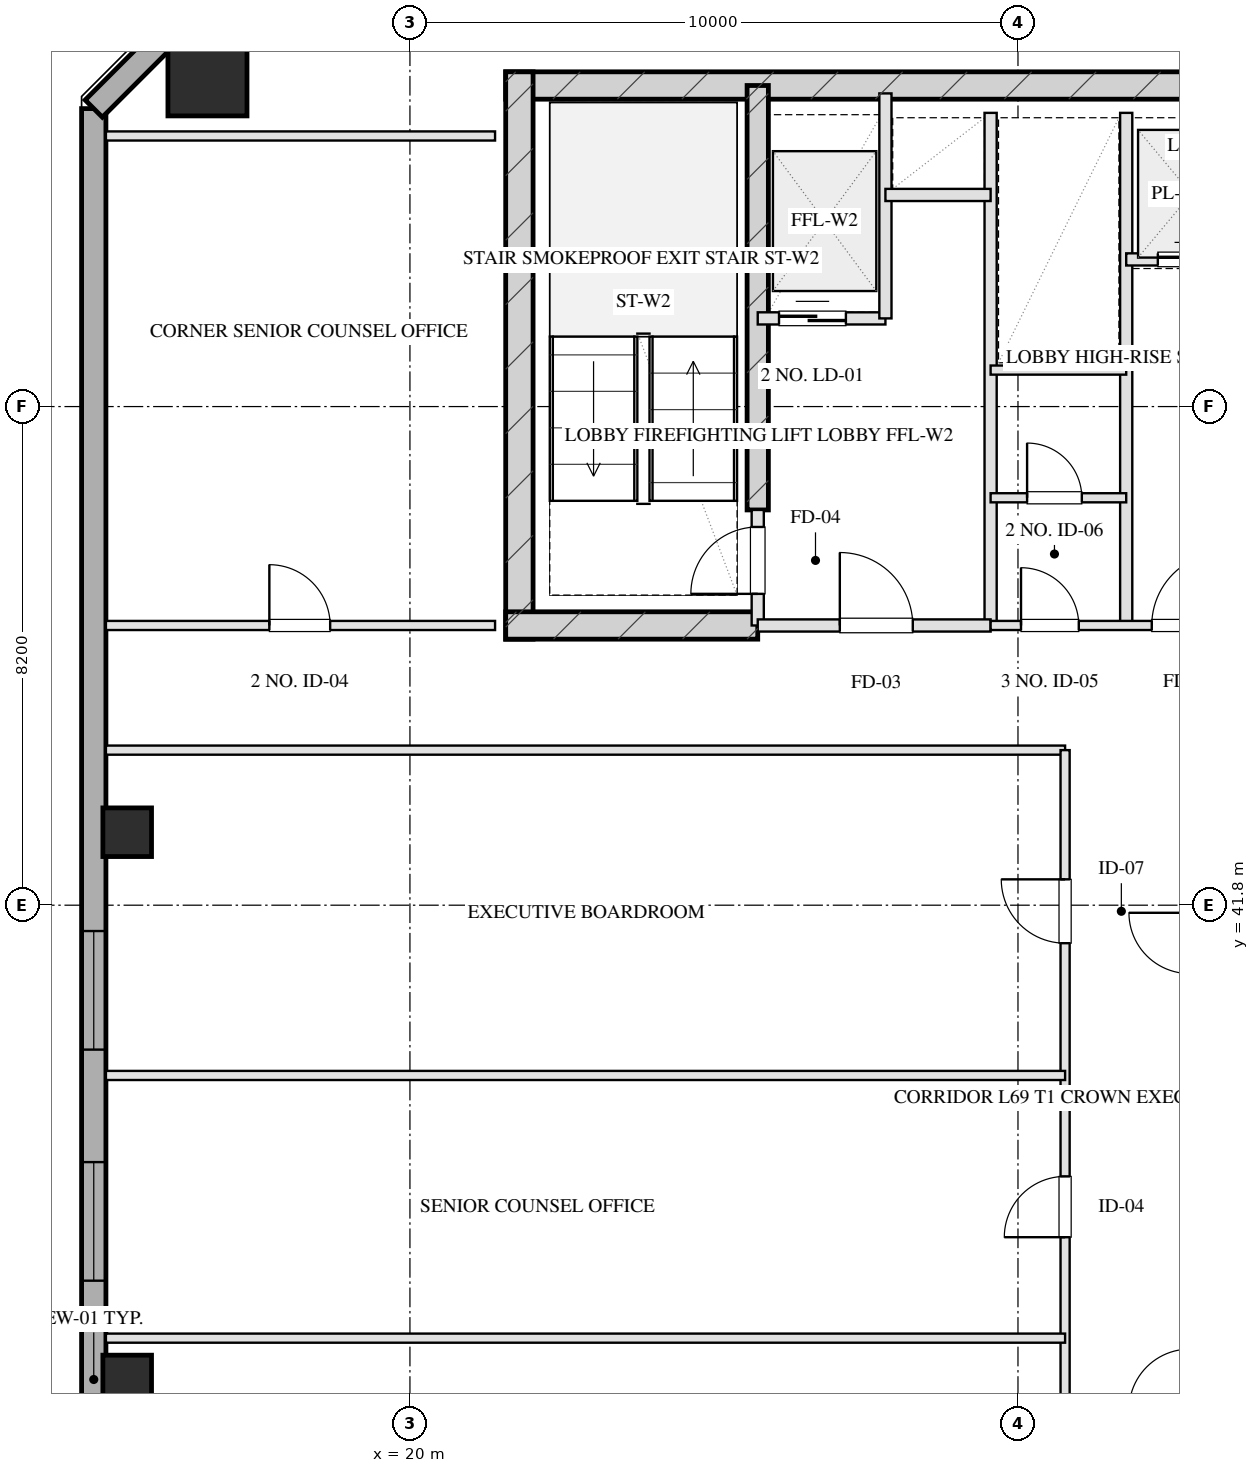
"""IFC4 building model, lengths in metres.
Left out: names, types, materials, properties, quantities, classifications, styles, units other than length and angle.
Written with IfcOpenShell. Run it as: python <this file> out.ifc"""

import sys

from ifc_helpers import new_model, si_unit, direction, frame, frame_2d, origin, origin_2d, place, context, subcontext, project, spatial, rectangle, hollow_rectangle, extrude, element, fill, save


model = new_model("IFC4")
c1 = context("Model", 3, precision=1e-05, world=origin(), true_north=direction((0.0, 1.0)))
c2 = subcontext(c1, "Body", "Model", "MODEL_VIEW")
j1 = project(units=[si_unit("LENGTHUNIT", "METRE"), si_unit("PLANEANGLEUNIT", "RADIAN")], contexts=[c1])
p1 = place(None, origin())
s1 = spatial("IfcSite", under=j1, at=p1, CompositionType="ELEMENT")
p2 = place(p1, origin())
s2 = spatial("IfcBuilding", under=s1, at=p2, CompositionType="ELEMENT")
p3 = place(p2, frame((0.0, 0.0, 253.6)))
s3 = spatial("IfcBuildingStorey", under=s2, at=p3, CompositionType="ELEMENT", Elevation=253.6)
p4 = place(p3, frame((21.575, 55.28, 0.0), z_axis=(0.0, 0.0, 1.0), x_axis=(1.0, 0.0, 0.0)))
e1 = element("IfcWall", 1, at=p4, inside=s3, PredefinedType="SHEAR", context=c2, shape_type="SweptSolid", body=[
    extrude(rectangle(XDim=16.85, YDim=0.45, at=frame_2d((8.425, 0.0))), origin(), (0.0, 0.0, 1.0), 3.2),
])
p5 = place(p3, frame((21.8, 46.175, 0.0), z_axis=(0.0, 0.0, 1.0), x_axis=(0.0, 1.0, 0.0)))
e2 = element("IfcWall", 2, at=p5, inside=s3, PredefinedType="SHEAR", context=c2, shape_type="SweptSolid", body=[
    extrude(rectangle(XDim=9.33, YDim=0.45, at=frame_2d((4.665, 0.0))), origin(), (0.0, 0.0, 1.0), 3.2),
])
p6 = place(p3, frame((25.72, 48.3, 0.0), z_axis=(0.0, 0.0, 1.0), x_axis=(0.0, 1.0, 0.0)))
e3 = element("IfcWall", 3, at=p6, inside=s3, PredefinedType="SHEAR", context=c2, shape_type="SweptSolid", body=[
    extrude(rectangle(XDim=6.98, YDim=0.35, at=frame_2d((3.49, 0.0))), origin(), (0.0, 0.0, 1.0), 3.2),
])
p7 = place(p3, frame((21.575, 46.4, 0.0), z_axis=(0.0, 0.0, 1.0), x_axis=(1.0, 0.0, 0.0)))
e4 = element("IfcWall", 4, at=p7, inside=s3, PredefinedType="SHEAR", context=c2, shape_type="SweptSolid", body=[
    extrude(rectangle(XDim=4.145, YDim=0.45, at=frame_2d((2.073, 0.0))), origin(), (0.0, 0.0, 1.0), 3.2),
])
p8 = place(p3, frame((16.67, 55.43, 0.0), z_axis=(0.0, 0.0, 1.0), x_axis=(1.0, 0.0, 0.0)))
e5 = element("IfcColumn", 5, at=p8, inside=s3, PredefinedType="COLUMN", context=c2, shape_type="SweptSolid", body=[
    extrude(hollow_rectangle(XDim=1.3, YDim=1.3, WallThickness=0.045, at=origin_2d()), origin(), (0.0, 0.0, 1.0), 3.201),
])
for number, where, z_axis, x_axis in (
    (6, (15.35, 34.0, 0.0), (0.0, 0.0, 1.0), (1.0, 0.0, 0.0)),
    (7, (15.35, 43.0, 0.0), (0.0, 0.0, 1.0), (1.0, 0.0, 0.0)),
):
    element("IfcColumn", number, at=place(p3, frame(where, z_axis=z_axis, x_axis=x_axis)), inside=s3, PredefinedType="COLUMN", context=c2, shape_type="SweptSolid", body=[
        extrude(hollow_rectangle(XDim=0.8, YDim=0.8, WallThickness=0.028, at=origin_2d()), origin(), (0.0, 0.0, 1.0), 3.201),
    ])
p9 = place(p3, frame((14.8, 13.1, 0.0), z_axis=(0.0, 0.0, 1.0), x_axis=(0.0, 1.0, 0.0)))
e8 = element("IfcWall", 8, at=p9, inside=s3, PredefinedType="SOLIDWALL", context=c2, shape_type="SweptSolid", body=[
    extrude(rectangle(XDim=41.8, YDim=0.4, at=frame_2d((20.9, 0.0))), origin(), (0.0, 0.0, 1.0), 2.36),
])
p10 = place(p9, frame((13.525, 0.0, 0.75)))
e9 = element("IfcOpeningElement", 9, at=p10, cuts=e8, PredefinedType="OPENING", context=c2, shape_type="SweptSolid", body=[
    extrude(rectangle(XDim=1.95, YDim=1.21, at=frame_2d((0.975, 0.605))), frame((0.0, 0.21, 0.0), z_axis=(0.0, -1.0, 0.0), x_axis=(1.0, 0.0, 0.0)), (0.0, 0.0, 1.0), 0.42),
])
p11 = place(p9, frame((17.325, 0.0, 0.75)))
e10 = element("IfcOpeningElement", 10, at=p11, cuts=e8, PredefinedType="OPENING", context=c2, shape_type="SweptSolid", body=[
    extrude(rectangle(XDim=1.95, YDim=1.21, at=frame_2d((0.975, 0.605))), frame((0.0, 0.21, 0.0), z_axis=(0.0, -1.0, 0.0), x_axis=(1.0, 0.0, 0.0)), (0.0, 0.0, 1.0), 0.42),
])
p12 = place(p9, frame((22.525, 0.0, 0.75)))
e11 = element("IfcOpeningElement", 11, at=p12, cuts=e8, PredefinedType="OPENING", context=c2, shape_type="SweptSolid", body=[
    extrude(rectangle(XDim=1.95, YDim=1.21, at=frame_2d((0.975, 0.605))), frame((0.0, 0.21, 0.0), z_axis=(0.0, -1.0, 0.0), x_axis=(1.0, 0.0, 0.0)), (0.0, 0.0, 1.0), 0.42),
])
p13 = place(p9, frame((26.325, 0.0, 0.75)))
e12 = element("IfcOpeningElement", 12, at=p13, cuts=e8, PredefinedType="OPENING", context=c2, shape_type="SweptSolid", body=[
    extrude(rectangle(XDim=1.95, YDim=1.21, at=frame_2d((0.975, 0.605))), frame((0.0, 0.21, 0.0), z_axis=(0.0, -1.0, 0.0), x_axis=(1.0, 0.0, 0.0)), (0.0, 0.0, 1.0), 0.42),
])
p14 = place(p3, frame((14.8, 54.9, 0.0), z_axis=(0.0, 0.0, 1.0), x_axis=(0.707070815327, 0.707142745217, 0.0)))
e13 = element("IfcWall", 13, at=p14, inside=s3, PredefinedType="SOLIDWALL", context=c2, shape_type="SweptSolid", body=[
    extrude(rectangle(XDim=3.394, YDim=0.4, at=frame_2d((1.697, 0.0))), origin(), (0.0, 0.0, 1.0), 2.36),
])
p15 = place(p3, frame((25.72, 46.4, 0.0), z_axis=(0.0, 0.0, 1.0), x_axis=(0.0, 1.0, 0.0)))
e14 = element("IfcWall", 14, at=p15, inside=s3, PredefinedType="PARTITIONING", context=c2, shape_type="SweptSolid", body=[
    extrude(rectangle(XDim=1.9, YDim=0.2, at=frame_2d((0.95, 0.0))), origin(), (0.0, 0.0, 1.0), 2.925),
])
p16 = place(p15, frame((0.52, 0.0, 0.0)))
e15 = element("IfcOpeningElement", 15, at=p16, cuts=e14, PredefinedType="OPENING", context=c2, shape_type="SweptSolid", body=[
    extrude(rectangle(XDim=1.1, YDim=2.05, at=frame_2d((0.55, 1.025))), frame((0.0, 0.11, 0.0), z_axis=(0.0, -1.0, 0.0), x_axis=(1.0, 0.0, 0.0)), (0.0, 0.0, 1.0), 0.22),
])
p17 = place(p3, frame((29.55, 46.4, 0.0), z_axis=(0.0, 0.0, 1.0), x_axis=(0.0, 1.0, 0.0)))
e16 = element("IfcWall", 16, at=p17, inside=s3, PredefinedType="PARTITIONING", context=c2, shape_type="SweptSolid", body=[
    extrude(rectangle(XDim=8.43, YDim=0.2, at=frame_2d((4.215, 0.0))), origin(), (0.0, 0.0, 1.0), 2.925),
])
p18 = place(p3, frame((25.72, 46.4, 0.0), z_axis=(0.0, 0.0, 1.0), x_axis=(1.0, 0.0, 0.0)))
e17 = element("IfcWall", 17, at=p18, inside=s3, PredefinedType="PARTITIONING", context=c2, shape_type="SweptSolid", body=[
    extrude(rectangle(XDim=3.83, YDim=0.2, at=frame_2d((1.915, 0.0))), origin(), (0.0, 0.0, 1.0), 2.925),
])
p19 = place(p18, frame((1.35, 0.0, 0.0)))
e18 = element("IfcOpeningElement", 18, at=p19, cuts=e17, PredefinedType="OPENING", context=c2, shape_type="SweptSolid", body=[
    extrude(rectangle(XDim=1.2, YDim=2.05, at=frame_2d((0.6, 1.025))), frame((0.0, 0.11, 0.0), z_axis=(0.0, -1.0, 0.0), x_axis=(1.0, 0.0, 0.0)), (0.0, 0.0, 1.0), 0.22),
])
p20 = place(p3, frame((25.72, 51.45, 0.0), z_axis=(0.0, 0.0, 1.0), x_axis=(1.0, 0.0, 0.0)))
e19 = element("IfcWall", 19, at=p20, inside=s3, PredefinedType="PARTITIONING", context=c2, shape_type="SweptSolid", body=[
    extrude(rectangle(XDim=2.1, YDim=0.2, at=frame_2d((1.05, 0.0))), origin(), (0.0, 0.0, 1.0), 2.925),
])
p21 = place(p20, frame((0.35, 0.0, 0.0)))
e20 = element("IfcOpeningElement", 20, at=p21, cuts=e19, PredefinedType="OPENING", context=c2, shape_type="SweptSolid", body=[
    extrude(rectangle(XDim=1.1, YDim=2.05, at=frame_2d((0.55, 1.025))), frame((0.0, 0.11, 0.0), z_axis=(0.0, -1.0, 0.0), x_axis=(1.0, 0.0, 0.0)), (0.0, 0.0, 1.0), 0.22),
])
p22 = place(p3, frame((27.82, 51.45, 0.0), z_axis=(0.0, 0.0, 1.0), x_axis=(0.0, 1.0, 0.0)))
e21 = element("IfcWall", 21, at=p22, inside=s3, PredefinedType="PARTITIONING", context=c2, shape_type="SweptSolid", body=[
    extrude(rectangle(XDim=3.7, YDim=0.2, at=frame_2d((1.85, 0.0))), origin(), (0.0, 0.0, 1.0), 2.925),
])
p23 = place(p3, frame((27.82, 53.48, 0.0), z_axis=(0.0, 0.0, 1.0), x_axis=(1.0, 0.0, 0.0)))
e22 = element("IfcWall", 22, at=p23, inside=s3, PredefinedType="PARTITIONING", context=c2, shape_type="SweptSolid", body=[
    extrude(rectangle(XDim=1.73, YDim=0.2, at=frame_2d((0.865, 0.0))), origin(), (0.0, 0.0, 1.0), 2.925),
])
p24 = place(p3, frame((31.78, 46.4, 0.0), z_axis=(0.0, 0.0, 1.0), x_axis=(0.0, 1.0, 0.0)))
e23 = element("IfcWall", 23, at=p24, inside=s3, PredefinedType="PARTITIONING", context=c2, shape_type="SweptSolid", body=[
    extrude(rectangle(XDim=8.43, YDim=0.2, at=frame_2d((4.215, 0.0))), origin(), (0.0, 0.0, 1.0), 2.925),
])
p25 = place(p3, frame((29.55, 46.4, 0.0), z_axis=(0.0, 0.0, 1.0), x_axis=(1.0, 0.0, 0.0)))
e24 = element("IfcWall", 24, at=p25, inside=s3, PredefinedType="PARTITIONING", context=c2, shape_type="SweptSolid", body=[
    extrude(rectangle(XDim=4.4, YDim=0.15, at=frame_2d((2.2, 0.0))), origin(), (0.0, 0.0, 1.0), 2.925),
])
p26 = place(p25, frame((0.5, 0.0, 0.0)))
e25 = element("IfcOpeningElement", 25, at=p26, cuts=e24, PredefinedType="OPENING", context=c2, shape_type="SweptSolid", body=[
    extrude(rectangle(XDim=0.95, YDim=2.05, at=frame_2d((0.475, 1.025))), frame((0.0, 0.085, 0.0), z_axis=(0.0, -1.0, 0.0), x_axis=(1.0, 0.0, 0.0)), (0.0, 0.0, 1.0), 0.17),
])
p27 = place(p25, frame((2.65, 0.0, 0.0)))
e26 = element("IfcOpeningElement", 26, at=p27, cuts=e24, PredefinedType="OPENING", context=c2, shape_type="SweptSolid", body=[
    extrude(rectangle(XDim=1.2, YDim=2.05, at=frame_2d((0.6, 1.025))), frame((0.0, 0.085, 0.0), z_axis=(0.0, -1.0, 0.0), x_axis=(1.0, 0.0, 0.0)), (0.0, 0.0, 1.0), 0.17),
])
p28 = place(p3, frame((29.55, 50.6, 0.0), z_axis=(0.0, 0.0, 1.0), x_axis=(1.0, 0.0, 0.0)))
e27 = element("IfcWall", 27, at=p28, inside=s3, PredefinedType="PARTITIONING", context=c2, shape_type="SweptSolid", body=[
    extrude(rectangle(XDim=2.23, YDim=0.15, at=frame_2d((1.115, 0.0))), origin(), (0.0, 0.0, 1.0), 2.925),
])
p29 = place(p3, frame((29.55, 48.5, 0.0), z_axis=(0.0, 0.0, 1.0), x_axis=(1.0, 0.0, 0.0)))
e28 = element("IfcWall", 28, at=p29, inside=s3, PredefinedType="PARTITIONING", context=c2, shape_type="SweptSolid", body=[
    extrude(rectangle(XDim=2.23, YDim=0.15, at=frame_2d((1.115, 0.0))), origin(), (0.0, 0.0, 1.0), 2.925),
])
p30 = place(p29, frame((0.6, 0.0, 0.0)))
e29 = element("IfcOpeningElement", 29, at=p30, cuts=e28, PredefinedType="OPENING", context=c2, shape_type="SweptSolid", body=[
    extrude(rectangle(XDim=0.9, YDim=2.05, at=frame_2d((0.45, 1.025))), frame((0.0, 0.085, 0.0), z_axis=(0.0, -1.0, 0.0), x_axis=(1.0, 0.0, 0.0)), (0.0, 0.0, 1.0), 0.17),
])
p31 = place(p3, frame((31.78, 52.42, 0.0), z_axis=(0.0, 0.0, 1.0), x_axis=(1.0, 0.0, 0.0)))
e30 = element("IfcWall", 30, at=p31, inside=s3, PredefinedType="PARTITIONING", context=c2, shape_type="SweptSolid", body=[
    extrude(rectangle(XDim=2.17, YDim=0.2, at=frame_2d((1.085, 0.0))), origin(), (0.0, 0.0, 1.0), 2.925),
])
p32 = place(p31, frame((0.52, 0.0, 0.0)))
e31 = element("IfcOpeningElement", 31, at=p32, cuts=e30, PredefinedType="OPENING", context=c2, shape_type="SweptSolid", body=[
    extrude(rectangle(XDim=1.1, YDim=2.05, at=frame_2d((0.55, 1.025))), frame((0.0, 0.11, 0.0), z_axis=(0.0, -1.0, 0.0), x_axis=(1.0, 0.0, 0.0)), (0.0, 0.0, 1.0), 0.22),
])
p33 = place(p3, frame((15.0, 54.45, 0.0), z_axis=(0.0, 0.0, 1.0), x_axis=(1.0, 0.0, 0.0)))
e32 = element("IfcWall", 32, at=p33, inside=s3, PredefinedType="PARTITIONING", context=c2, shape_type="SweptSolid", body=[
    extrude(rectangle(XDim=6.4, YDim=0.15, at=frame_2d((3.2, 0.0))), origin(), (0.0, 0.0, 1.0), 2.925),
])
p34 = place(p3, frame((15.0, 46.4, 0.0), z_axis=(0.0, 0.0, 1.0), x_axis=(1.0, 0.0, 0.0)))
e33 = element("IfcWall", 33, at=p34, inside=s3, PredefinedType="PARTITIONING", context=c2, shape_type="SweptSolid", body=[
    extrude(rectangle(XDim=6.4, YDim=0.15, at=frame_2d((3.2, 0.0))), origin(), (0.0, 0.0, 1.0), 2.925),
])
p35 = place(p34, frame((2.688, 0.0, 0.0)))
e34 = element("IfcOpeningElement", 34, at=p35, cuts=e33, PredefinedType="OPENING", context=c2, shape_type="SweptSolid", body=[
    extrude(rectangle(XDim=1.0, YDim=2.05, at=frame_2d((0.5, 1.025))), frame((0.0, 0.085, 0.0), z_axis=(0.0, -1.0, 0.0), x_axis=(1.0, 0.0, 0.0)), (0.0, 0.0, 1.0), 0.17),
])
p36 = place(p3, frame((15.0, 44.35, 0.0), z_axis=(0.0, 0.0, 1.0), x_axis=(1.0, 0.0, 0.0)))
e35 = element("IfcWall", 35, at=p36, inside=s3, PredefinedType="PARTITIONING", context=c2, shape_type="SweptSolid", body=[
    extrude(rectangle(XDim=15.775, YDim=0.15, at=frame_2d((7.887, 0.0))), origin(), (0.0, 0.0, 1.0), 2.925),
])
p37 = place(p3, frame((30.775, 23.65, 0.0), z_axis=(0.0, 0.0, 1.0), x_axis=(0.0, 1.0, 0.0)))
e36 = element("IfcWall", 36, at=p37, inside=s3, PredefinedType="PARTITIONING", context=c2, shape_type="SweptSolid", body=[
    extrude(rectangle(XDim=20.7, YDim=0.15, at=frame_2d((10.35, 0.0))), origin(), (0.0, 0.0, 1.0), 2.925),
])
p38 = place(p37, frame((2.175, 0.0, 0.0)))
e37 = element("IfcOpeningElement", 37, at=p38, cuts=e36, PredefinedType="OPENING", context=c2, shape_type="SweptSolid", body=[
    extrude(rectangle(XDim=1.0, YDim=2.05, at=frame_2d((0.5, 1.025))), frame((0.0, 0.085, 0.0), z_axis=(0.0, -1.0, 0.0), x_axis=(1.0, 0.0, 0.0)), (0.0, 0.0, 1.0), 0.17),
])
p39 = place(p37, frame((7.69, 0.0, 0.0)))
e38 = element("IfcOpeningElement", 38, at=p39, cuts=e36, PredefinedType="OPENING", context=c2, shape_type="SweptSolid", body=[
    extrude(rectangle(XDim=1.0, YDim=2.05, at=frame_2d((0.5, 1.025))), frame((0.0, 0.085, 0.0), z_axis=(0.0, -1.0, 0.0), x_axis=(1.0, 0.0, 0.0)), (0.0, 0.0, 1.0), 0.17),
])
p40 = place(p37, frame((12.69, 0.0, 0.0)))
e39 = element("IfcOpeningElement", 39, at=p40, cuts=e36, PredefinedType="OPENING", context=c2, shape_type="SweptSolid", body=[
    extrude(rectangle(XDim=1.0, YDim=2.05, at=frame_2d((0.5, 1.025))), frame((0.0, 0.085, 0.0), z_axis=(0.0, -1.0, 0.0), x_axis=(1.0, 0.0, 0.0)), (0.0, 0.0, 1.0), 0.17),
])
p41 = place(p37, frame((17.525, 0.0, 0.0)))
e40 = element("IfcOpeningElement", 40, at=p41, cuts=e36, PredefinedType="OPENING", context=c2, shape_type="SweptSolid", body=[
    extrude(rectangle(XDim=1.05, YDim=2.05, at=frame_2d((0.525, 1.025))), frame((0.0, 0.085, 0.0), z_axis=(0.0, -1.0, 0.0), x_axis=(1.0, 0.0, 0.0)), (0.0, 0.0, 1.0), 0.17),
])
for number, where, z_axis, x_axis in (
    (41, (15.0, 34.68, 0.0), (0.0, 0.0, 1.0), (1.0, 0.0, 0.0)),
    (42, (15.0, 39.0, 0.0), (0.0, 0.0, 1.0), (1.0, 0.0, 0.0)),
):
    element("IfcWall", number, at=place(p3, frame(where, z_axis=z_axis, x_axis=x_axis)), inside=s3, PredefinedType="PARTITIONING", context=c2, shape_type="SweptSolid", body=[
        extrude(rectangle(XDim=15.775, YDim=0.15, at=frame_2d((7.887, 0.0))), origin(), (0.0, 0.0, 1.0), 2.925),
    ])
p42 = place(p12, origin())
e43 = element("IfcWindow", 43, at=p42, inside=s3, PartitioningType="TRIPLE_PANEL_VERTICAL", PredefinedType="WINDOW", context=c2, shape_type="SweptSolid", body=[
    extrude(rectangle(XDim=1.95, YDim=1.21, at=frame_2d((0.975, 0.605))), frame((0.0, 0.03, 0.0), z_axis=(0.0, -1.0, 0.0), x_axis=(1.0, 0.0, 0.0)), (0.0, 0.0, 1.0), 0.06),
])
fill(e11, e43)
p43 = place(p13, origin())
e44 = element("IfcWindow", 44, at=p43, inside=s3, PartitioningType="TRIPLE_PANEL_VERTICAL", PredefinedType="WINDOW", context=c2, shape_type="SweptSolid", body=[
    extrude(rectangle(XDim=1.95, YDim=1.21, at=frame_2d((0.975, 0.605))), frame((0.0, 0.03, 0.0), z_axis=(0.0, -1.0, 0.0), x_axis=(1.0, 0.0, 0.0)), (0.0, 0.0, 1.0), 0.06),
])
fill(e12, e44)
p44 = place(p16, origin())
e45 = element("IfcDoor", 45, at=p44, inside=s3, OperationType="SINGLE_SWING_LEFT", PredefinedType="DOOR", context=c2, shape_type="SweptSolid", body=[
    extrude(rectangle(XDim=1.1, YDim=2.05, at=frame_2d((0.55, 1.025))), frame((0.0, 0.025, 0.0), z_axis=(0.0, -1.0, 0.0), x_axis=(1.0, 0.0, 0.0)), (0.0, 0.0, 1.0), 0.05),
])
fill(e15, e45)
p45 = place(p19, origin())
e46 = element("IfcDoor", 46, at=p45, inside=s3, OperationType="SINGLE_SWING_LEFT", PredefinedType="DOOR", context=c2, shape_type="SweptSolid", body=[
    extrude(rectangle(XDim=1.2, YDim=2.05, at=frame_2d((0.6, 1.025))), frame((0.0, 0.025, 0.0), z_axis=(0.0, -1.0, 0.0), x_axis=(1.0, 0.0, 0.0)), (0.0, 0.0, 1.0), 0.05),
])
fill(e18, e46)
p46 = place(p21, origin())
e47 = element("IfcDoor", 47, at=p46, inside=s3, OperationType="DOUBLE_DOOR_SLIDING", PredefinedType="DOOR", context=c2, shape_type="SweptSolid", body=[
    extrude(rectangle(XDim=1.1, YDim=2.05, at=frame_2d((0.55, 1.025))), frame((0.0, 0.025, 0.0), z_axis=(0.0, -1.0, 0.0), x_axis=(1.0, 0.0, 0.0)), (0.0, 0.0, 1.0), 0.05),
])
fill(e20, e47)
p47 = place(p26, origin())
e48 = element("IfcDoor", 48, at=p47, inside=s3, OperationType="SINGLE_SWING_LEFT", PredefinedType="DOOR", context=c2, shape_type="SweptSolid", body=[
    extrude(rectangle(XDim=0.95, YDim=2.05, at=frame_2d((0.475, 1.025))), frame((0.0, 0.025, 0.0), z_axis=(0.0, -1.0, 0.0), x_axis=(1.0, 0.0, 0.0)), (0.0, 0.0, 1.0), 0.05),
])
fill(e25, e48)
p48 = place(p27, origin())
e49 = element("IfcDoor", 49, at=p48, inside=s3, OperationType="SINGLE_SWING_RIGHT", PredefinedType="DOOR", context=c2, shape_type="SweptSolid", body=[
    extrude(rectangle(XDim=1.2, YDim=2.05, at=frame_2d((0.6, 1.025))), frame((0.0, 0.025, 0.0), z_axis=(0.0, -1.0, 0.0), x_axis=(1.0, 0.0, 0.0)), (0.0, 0.0, 1.0), 0.05),
])
fill(e26, e49)
p49 = place(p30, origin())
e50 = element("IfcDoor", 50, at=p49, inside=s3, OperationType="SINGLE_SWING_LEFT", PredefinedType="DOOR", context=c2, shape_type="SweptSolid", body=[
    extrude(rectangle(XDim=0.9, YDim=2.05, at=frame_2d((0.45, 1.025))), frame((0.0, 0.025, 0.0), z_axis=(0.0, -1.0, 0.0), x_axis=(1.0, 0.0, 0.0)), (0.0, 0.0, 1.0), 0.05),
])
fill(e29, e50)
p50 = place(p32, origin())
e51 = element("IfcDoor", 51, at=p50, inside=s3, OperationType="DOUBLE_DOOR_SLIDING", PredefinedType="DOOR", context=c2, shape_type="SweptSolid", body=[
    extrude(rectangle(XDim=1.1, YDim=2.05, at=frame_2d((0.55, 1.025))), frame((0.0, 0.025, 0.0), z_axis=(0.0, -1.0, 0.0), x_axis=(1.0, 0.0, 0.0)), (0.0, 0.0, 1.0), 0.05),
])
fill(e31, e51)
p51 = place(p35, origin())
e52 = element("IfcDoor", 52, at=p51, inside=s3, OperationType="SINGLE_SWING_LEFT", PredefinedType="DOOR", context=c2, shape_type="SweptSolid", body=[
    extrude(rectangle(XDim=1.0, YDim=2.05, at=frame_2d((0.5, 1.025))), frame((0.0, 0.025, 0.0), z_axis=(0.0, -1.0, 0.0), x_axis=(1.0, 0.0, 0.0)), (0.0, 0.0, 1.0), 0.05),
])
fill(e34, e52)
p52 = place(p40, origin())
e53 = element("IfcDoor", 53, at=p52, inside=s3, OperationType="SINGLE_SWING_LEFT", PredefinedType="DOOR", context=c2, shape_type="SweptSolid", body=[
    extrude(rectangle(XDim=1.0, YDim=2.05, at=frame_2d((0.5, 1.025))), frame((0.0, 0.025, 0.0), z_axis=(0.0, -1.0, 0.0), x_axis=(1.0, 0.0, 0.0)), (0.0, 0.0, 1.0), 0.05),
])
fill(e39, e53)
p53 = place(p41, origin())
e54 = element("IfcDoor", 54, at=p53, inside=s3, OperationType="SINGLE_SWING_RIGHT", PredefinedType="DOOR", context=c2, shape_type="SweptSolid", body=[
    extrude(rectangle(XDim=1.05, YDim=2.05, at=frame_2d((0.525, 1.025))), frame((0.0, 0.025, 0.0), z_axis=(0.0, -1.0, 0.0), x_axis=(1.0, 0.0, 0.0)), (0.0, 0.0, 1.0), 0.05),
])
fill(e40, e54)
save(model, sys.argv[1])
